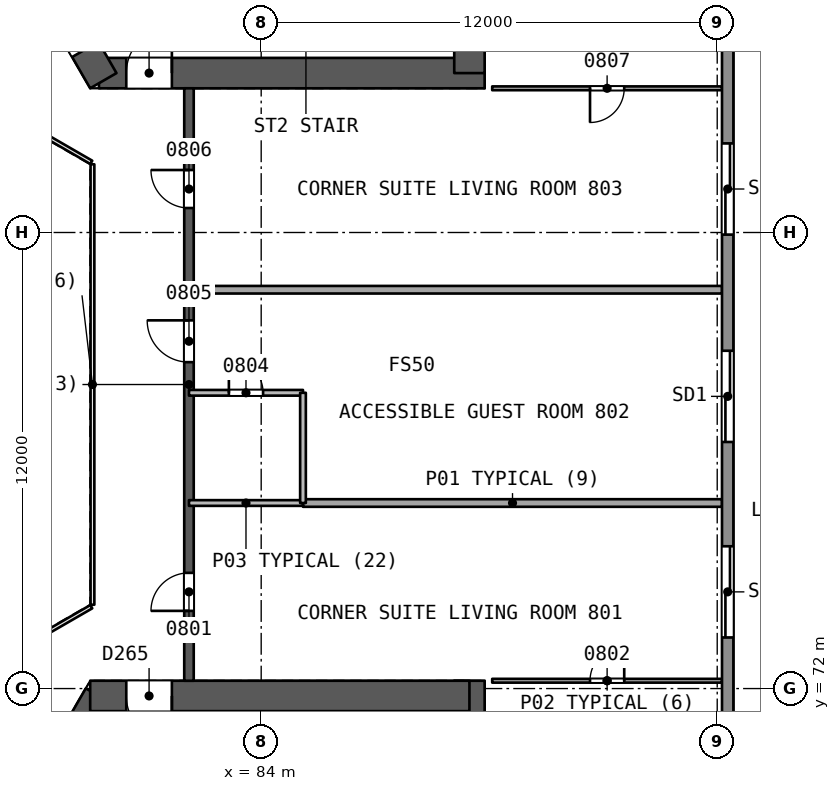
"""IFC4 building model, lengths in metres.
Left out: names, types, materials, properties, quantities, classifications, styles, units other than length and angle.
Written with IfcOpenShell. Run it as: python <this file> out.ifc"""

import sys

from ifc_helpers import new_model, si_unit, direction, frame, frame_2d, origin, place, context, subcontext, project, spatial, rectangle, extrude, element, fill, save


model = new_model("IFC4")
c1 = context("Model", 3, precision=1e-05, world=origin(), true_north=direction((0.0, 1.0)))
c2 = subcontext(c1, "Body", "Model", "MODEL_VIEW")
j1 = project(units=[si_unit("LENGTHUNIT", "METRE"), si_unit("PLANEANGLEUNIT", "RADIAN")], contexts=[c1])
p1 = place(None, origin())
s1 = spatial("IfcSite", under=j1, at=p1, CompositionType="ELEMENT")
p2 = place(p1, origin())
s2 = spatial("IfcBuilding", under=s1, at=p2, CompositionType="ELEMENT")
p3 = place(p2, frame((0.0, 0.0, 41.1)))
s3 = spatial("IfcBuildingStorey", under=s2, at=p3, CompositionType="ELEMENT", Elevation=41.1)
p4 = place(p3, frame((79.731, 88.194, 0.0), z_axis=(0.0, 0.0, 1.0), x_axis=(1.0, 0.0, 0.0)))
e1 = element("IfcWall", 1, at=p4, inside=s3, PredefinedType="SHEAR", context=c2, shape_type="SweptSolid", body=[
    extrude(rectangle(XDim=10.149, YDim=0.8, at=frame_2d((5.074, 0.0))), origin(), (0.0, 0.0, 1.0), 3.7),
])
p5 = place(p4, frame((0.719, 0.0, 0.0)))
e2 = element("IfcOpeningElement", 2, at=p5, cuts=e1, PredefinedType="OPENING", context=c2, shape_type="SweptSolid", body=[
    extrude(rectangle(XDim=1.2, YDim=2.1, at=frame_2d((0.6, 1.05))), frame((0.0, 0.411, 0.0), z_axis=(0.0, -1.0, 0.0), x_axis=(1.0, 0.0, 0.0)), (0.0, 0.0, 1.0), 0.821),
])
p6 = place(p3, frame((89.48, 88.194, 0.0), z_axis=(0.0, 0.0, 1.0), x_axis=(0.0, 1.0, 0.0)))
e3 = element("IfcWall", 3, at=p6, inside=s3, PredefinedType="SHEAR", context=c2, shape_type="SweptSolid", body=[
    extrude(rectangle(XDim=13.933, YDim=0.8, at=frame_2d((6.967, 0.0))), origin(), (0.0, 0.0, 1.0), 3.7),
])
p7 = place(p3, frame((74.856, 96.637, 0.0), z_axis=(0.0, 0.0, 1.0), x_axis=(0.499993500917, -0.866029155999, 0.0)))
e4 = element("IfcWall", 4, at=p7, inside=s3, PredefinedType="SHEAR", context=c2, shape_type="SweptSolid", body=[
    extrude(rectangle(XDim=9.98, YDim=0.8, at=frame_2d((4.99, 0.0))), origin(), (0.0, 0.0, 1.0), 3.7),
])
p8 = place(p7, frame((7.83, 0.0, 0.0)))
e5 = element("IfcOpeningElement", 5, at=p8, cuts=e4, PredefinedType="OPENING", context=c2, shape_type="SweptSolid", body=[
    extrude(rectangle(XDim=1.2, YDim=2.1, at=frame_2d((0.6, 1.05))), frame((0.0, 0.411, 0.0), z_axis=(0.0, -1.0, 0.0), x_axis=(1.0, 0.0, 0.0)), (0.0, 0.0, 1.0), 0.821),
])
p9 = place(p3, frame((79.731, 71.806, 0.0), z_axis=(0.0, 0.0, 1.0), x_axis=(-0.49999662545, -0.866027352073, 0.0)))
e6 = element("IfcWall", 6, at=p9, inside=s3, PredefinedType="SHEAR", context=c2, shape_type="SweptSolid", body=[
    extrude(rectangle(XDim=10.149, YDim=0.8, at=frame_2d((5.074, 0.0))), origin(), (0.0, 0.0, 1.0), 3.7),
])
p10 = place(p9, frame((0.719, 0.0, 0.0)))
e7 = element("IfcOpeningElement", 7, at=p10, cuts=e6, PredefinedType="OPENING", context=c2, shape_type="SweptSolid", body=[
    extrude(rectangle(XDim=1.2, YDim=2.1, at=frame_2d((0.6, 1.05))), frame((0.0, 0.411, 0.0), z_axis=(0.0, -1.0, 0.0), x_axis=(1.0, 0.0, 0.0)), (0.0, 0.0, 1.0), 0.821),
])
p11 = place(p3, frame((89.48, 58.103, 0.0), z_axis=(0.0, 0.0, 1.0), x_axis=(0.0, 1.0, 0.0)))
e8 = element("IfcWall", 8, at=p11, inside=s3, PredefinedType="SHEAR", context=c2, shape_type="SweptSolid", body=[
    extrude(rectangle(XDim=14.103, YDim=0.8, at=frame_2d((7.051, 0.0))), origin(), (0.0, 0.0, 1.0), 3.7),
])
p12 = place(p3, frame((89.48, 71.806, 0.0), z_axis=(0.0, 0.0, 1.0), x_axis=(-1.0, 0.0, 0.0)))
e9 = element("IfcWall", 9, at=p12, inside=s3, PredefinedType="SHEAR", context=c2, shape_type="SweptSolid", body=[
    extrude(rectangle(XDim=9.98, YDim=0.8, at=frame_2d((4.99, 0.0))), origin(), (0.0, 0.0, 1.0), 3.7),
])
p13 = place(p12, frame((7.83, 0.0, 0.0)))
e10 = element("IfcOpeningElement", 10, at=p13, cuts=e9, PredefinedType="OPENING", context=c2, shape_type="SweptSolid", body=[
    extrude(rectangle(XDim=1.2, YDim=2.1, at=frame_2d((0.6, 1.05))), frame((0.0, 0.411, 0.0), z_axis=(0.0, -1.0, 0.0), x_axis=(1.0, 0.0, 0.0)), (0.0, 0.0, 1.0), 0.821),
])
p14 = place(p3, frame((82.1, 72.206, 0.0), z_axis=(0.0, 0.0, 1.0), x_axis=(0.0, 1.0, 0.0)))
e11 = element("IfcWall", 11, at=p14, inside=s3, PredefinedType="SHEAR", context=c2, shape_type="SweptSolid", body=[
    extrude(rectangle(XDim=15.588, YDim=0.25, at=frame_2d((7.794, 0.0))), origin(), (0.0, 0.0, 1.0), 3.2),
])
p15 = place(p14, frame((1.838, 0.0, 0.0)))
e12 = element("IfcOpeningElement", 12, at=p15, cuts=e11, PredefinedType="OPENING", context=c2, shape_type="SweptSolid", body=[
    extrude(rectangle(XDim=1.0, YDim=2.1, at=frame_2d((0.5, 1.05))), frame((0.0, 0.135, 0.0), z_axis=(0.0, -1.0, 0.0), x_axis=(1.0, 0.0, 0.0)), (0.0, 0.0, 1.0), 0.271),
])
p16 = place(p14, frame((8.383, 0.0, 0.0)))
e13 = element("IfcOpeningElement", 13, at=p16, cuts=e11, PredefinedType="OPENING", context=c2, shape_type="SweptSolid", body=[
    extrude(rectangle(XDim=1.1, YDim=2.1, at=frame_2d((0.55, 1.05))), frame((0.0, 0.135, 0.0), z_axis=(0.0, -1.0, 0.0), x_axis=(1.0, 0.0, 0.0)), (0.0, 0.0, 1.0), 0.271),
])
p17 = place(p14, frame((12.438, 0.0, 0.0)))
e14 = element("IfcOpeningElement", 14, at=p17, cuts=e11, PredefinedType="OPENING", context=c2, shape_type="SweptSolid", body=[
    extrude(rectangle(XDim=1.0, YDim=2.1, at=frame_2d((0.5, 1.05))), frame((0.0, 0.135, 0.0), z_axis=(0.0, -1.0, 0.0), x_axis=(1.0, 0.0, 0.0)), (0.0, 0.0, 1.0), 0.271),
])
p18 = place(p3, frame((90.079, 72.206, 0.0), z_axis=(0.0, 0.0, 1.0), x_axis=(1.0, 0.0, 0.0)))
e15 = element("IfcWall", 15, at=p18, inside=s3, PredefinedType="PARTITIONING", context=c2, shape_type="SweptSolid", body=[
    extrude(rectangle(XDim=6.048, YDim=0.1, at=frame_2d((3.024, 0.0))), origin(), (0.0, 0.0, 1.0), 3.2),
])
p19 = place(p18, frame((2.574, 0.0, 0.0)))
e16 = element("IfcOpeningElement", 16, at=p19, cuts=e15, PredefinedType="OPENING", context=c2, shape_type="SweptSolid", body=[
    extrude(rectangle(XDim=0.9, YDim=2.1, at=frame_2d((0.45, 1.05))), frame((0.0, 0.061, 0.0), z_axis=(0.0, -1.0, 0.0), x_axis=(1.0, 0.0, 0.0)), (0.0, 0.0, 1.0), 0.121),
])
p20 = place(p3, frame((96.127, 76.882, 0.0), z_axis=(0.0, 0.0, 1.0), x_axis=(-1.0, 0.0, 0.0)))
e17 = element("IfcWall", 17, at=p20, inside=s3, PredefinedType="PARTITIONING", context=c2, shape_type="SweptSolid", body=[
    extrude(rectangle(XDim=11.027, YDim=0.2, at=frame_2d((5.513, 0.0))), origin(), (0.0, 0.0, 1.0), 3.2),
])
p21 = place(p3, frame((85.1, 76.882, 0.0), z_axis=(0.0, 0.0, 1.0), x_axis=(-1.0, 0.0, 0.0)))
e18 = element("IfcWall", 18, at=p21, inside=s3, PredefinedType="PARTITIONING", context=c2, shape_type="SweptSolid", body=[
    extrude(rectangle(XDim=3.0, YDim=0.15, at=frame_2d((1.5, 0.0))), origin(), (0.0, 0.0, 1.0), 3.2),
])
p22 = place(p3, frame((82.1, 79.782, 0.0), z_axis=(0.0, 0.0, 1.0), x_axis=(1.0, 0.0, 0.0)))
e19 = element("IfcWall", 19, at=p22, inside=s3, PredefinedType="PARTITIONING", context=c2, shape_type="SweptSolid", body=[
    extrude(rectangle(XDim=3.0, YDim=0.15, at=frame_2d((1.5, 0.0))), origin(), (0.0, 0.0, 1.0), 3.2),
])
p23 = place(p22, frame((1.05, 0.0, 0.0)))
e20 = element("IfcOpeningElement", 20, at=p23, cuts=e19, PredefinedType="OPENING", context=c2, shape_type="SweptSolid", body=[
    extrude(rectangle(XDim=0.9, YDim=2.1, at=frame_2d((0.45, 1.05))), frame((0.0, 0.085, 0.0), z_axis=(0.0, -1.0, 0.0), x_axis=(1.0, 0.0, 0.0)), (0.0, 0.0, 1.0), 0.171),
])
p24 = place(p3, frame((85.1, 79.782, 0.0), z_axis=(0.0, 0.0, 1.0), x_axis=(0.0, -1.0, 0.0)))
e21 = element("IfcWall", 21, at=p24, inside=s3, PredefinedType="PARTITIONING", context=c2, shape_type="SweptSolid", body=[
    extrude(rectangle(XDim=2.9, YDim=0.15, at=frame_2d((1.45, 0.0))), origin(), (0.0, 0.0, 1.0), 3.2),
])
p25 = place(p3, frame((96.127, 82.494, 0.0), z_axis=(0.0, 0.0, 1.0), x_axis=(-1.0, 0.0, 0.0)))
e22 = element("IfcWall", 22, at=p25, inside=s3, PredefinedType="PARTITIONING", context=c2, shape_type="SweptSolid", body=[
    extrude(rectangle(XDim=14.027, YDim=0.2, at=frame_2d((7.013, 0.0))), origin(), (0.0, 0.0, 1.0), 3.2),
])
p26 = place(p3, frame((96.127, 87.794, 0.0), z_axis=(0.0, 0.0, 1.0), x_axis=(-1.0, 0.0, 0.0)))
e23 = element("IfcWall", 23, at=p26, inside=s3, PredefinedType="PARTITIONING", context=c2, shape_type="SweptSolid", body=[
    extrude(rectangle(XDim=6.048, YDim=0.1, at=frame_2d((3.024, 0.0))), origin(), (0.0, 0.0, 1.0), 3.2),
])
p27 = place(p26, frame((2.574, 0.0, 0.0)))
e24 = element("IfcOpeningElement", 24, at=p27, cuts=e23, PredefinedType="OPENING", context=c2, shape_type="SweptSolid", body=[
    extrude(rectangle(XDim=0.9, YDim=2.1, at=frame_2d((0.45, 1.05))), frame((0.0, 0.061, 0.0), z_axis=(0.0, -1.0, 0.0), x_axis=(1.0, 0.0, 0.0)), (0.0, 0.0, 1.0), 0.121),
])
p28 = place(p3, frame((96.276, 110.59, 0.0), z_axis=(0.0, 0.0, 1.0), x_axis=(0.0, -1.0, 0.0)))
e25 = element("IfcWall", 25, at=p28, inside=s3, PredefinedType="SOLIDWALL", context=c2, shape_type="SweptSolid", body=[
    extrude(rectangle(XDim=61.18, YDim=0.3, at=frame_2d((30.59, 0.0))), origin(), (0.0, 0.0, 1.0), 3.2),
])
p29 = place(p28, frame((29.702, 0.0, 0.0)))
e26 = element("IfcOpeningElement", 26, at=p29, cuts=e25, PredefinedType="OPENING", context=c2, shape_type="SweptSolid", body=[
    extrude(rectangle(XDim=2.4, YDim=2.4, at=frame_2d((1.2, 1.2))), frame((0.0, 0.161, 0.0), z_axis=(0.0, -1.0, 0.0), x_axis=(1.0, 0.0, 0.0)), (0.0, 0.0, 1.0), 0.321),
])
p30 = place(p28, frame((34.846, 0.0, 0.0)))
e27 = element("IfcOpeningElement", 27, at=p30, cuts=e25, PredefinedType="OPENING", context=c2, shape_type="SweptSolid", body=[
    extrude(rectangle(XDim=2.4, YDim=2.4, at=frame_2d((1.2, 1.2))), frame((0.0, 0.161, 0.0), z_axis=(0.0, -1.0, 0.0), x_axis=(1.0, 0.0, 0.0)), (0.0, 0.0, 1.0), 0.321),
])
p31 = place(p28, frame((47.439, 0.0, 0.0)))
e28 = element("IfcOpeningElement", 28, at=p31, cuts=e25, PredefinedType="OPENING", context=c2, shape_type="SweptSolid", body=[
    extrude(rectangle(XDim=2.4, YDim=2.4, at=frame_2d((1.2, 1.2))), frame((0.0, 0.161, 0.0), z_axis=(0.0, -1.0, 0.0), x_axis=(1.0, 0.0, 0.0)), (0.0, 0.0, 1.0), 0.321),
])
p32 = place(p28, frame((24.246, 0.0, 0.0)))
e29 = element("IfcOpeningElement", 29, at=p32, cuts=e25, PredefinedType="OPENING", context=c2, shape_type="SweptSolid", body=[
    extrude(rectangle(XDim=2.4, YDim=2.4, at=frame_2d((1.2, 1.2))), frame((0.0, 0.161, 0.0), z_axis=(0.0, -1.0, 0.0), x_axis=(1.0, 0.0, 0.0)), (0.0, 0.0, 1.0), 0.321),
])
p33 = place(p28, frame((11.287, 0.0, 0.0)))
e30 = element("IfcOpeningElement", 30, at=p33, cuts=e25, PredefinedType="OPENING", context=c2, shape_type="SweptSolid", body=[
    extrude(rectangle(XDim=2.4, YDim=2.4, at=frame_2d((1.2, 1.2))), frame((0.0, 0.161, 0.0), z_axis=(0.0, -1.0, 0.0), x_axis=(1.0, 0.0, 0.0)), (0.0, 0.0, 1.0), 0.321),
])
p34 = place(p3, frame((37.87, 83.13, 0.0), z_axis=(0.0, 0.0, 1.0), x_axis=(0.866026630825, 0.499997874697, 0.0)))
e31 = element("IfcWall", 31, at=p34, inside=s3, PredefinedType="SOLIDWALL", context=c2, shape_type="SweptSolid", body=[
    extrude(rectangle(XDim=61.18, YDim=0.3, at=frame_2d((30.59, 0.0))), origin(), (0.0, 0.0, 1.0), 3.2),
])
p35 = place(p34, frame((12.181, 0.0, 0.0)))
e32 = element("IfcOpeningElement", 32, at=p35, cuts=e31, PredefinedType="OPENING", context=c2, shape_type="SweptSolid", body=[
    extrude(rectangle(XDim=2.4, YDim=2.4, at=frame_2d((1.2, 1.2))), frame((0.0, 0.161, 0.0), z_axis=(0.0, -1.0, 0.0), x_axis=(1.0, 0.0, 0.0)), (0.0, 0.0, 1.0), 0.321),
])
p36 = place(p34, frame((34.846, 0.0, 0.0)))
e33 = element("IfcOpeningElement", 33, at=p36, cuts=e31, PredefinedType="OPENING", context=c2, shape_type="SweptSolid", body=[
    extrude(rectangle(XDim=2.4, YDim=2.4, at=frame_2d((1.2, 1.2))), frame((0.0, 0.161, 0.0), z_axis=(0.0, -1.0, 0.0), x_axis=(1.0, 0.0, 0.0)), (0.0, 0.0, 1.0), 0.321),
])
p37 = place(p34, frame((47.439, 0.0, 0.0)))
e34 = element("IfcOpeningElement", 34, at=p37, cuts=e31, PredefinedType="OPENING", context=c2, shape_type="SweptSolid", body=[
    extrude(rectangle(XDim=2.4, YDim=2.4, at=frame_2d((1.2, 1.2))), frame((0.0, 0.161, 0.0), z_axis=(0.0, -1.0, 0.0), x_axis=(1.0, 0.0, 0.0)), (0.0, 0.0, 1.0), 0.321),
])
p38 = place(p34, frame((29.078, 0.0, 0.0)))
e35 = element("IfcOpeningElement", 35, at=p38, cuts=e31, PredefinedType="OPENING", context=c2, shape_type="SweptSolid", body=[
    extrude(rectangle(XDim=2.4, YDim=2.4, at=frame_2d((1.2, 1.2))), frame((0.0, 0.161, 0.0), z_axis=(0.0, -1.0, 0.0), x_axis=(1.0, 0.0, 0.0)), (0.0, 0.0, 1.0), 0.321),
])
p39 = place(p3, frame((90.854, 46.28, 0.0), z_axis=(0.0, 0.0, 1.0), x_axis=(-0.866026630825, 0.499997874697, 0.0)))
e36 = element("IfcWall", 36, at=p39, inside=s3, PredefinedType="SOLIDWALL", context=c2, shape_type="SweptSolid", body=[
    extrude(rectangle(XDim=61.18, YDim=0.3, at=frame_2d((30.59, 0.0))), origin(), (0.0, 0.0, 1.0), 3.2),
])
p40 = place(p39, frame((29.39, 0.0, 0.0)))
e37 = element("IfcOpeningElement", 37, at=p40, cuts=e36, PredefinedType="OPENING", context=c2, shape_type="SweptSolid", body=[
    extrude(rectangle(XDim=2.4, YDim=2.4, at=frame_2d((1.2, 1.2))), frame((0.0, 0.161, 0.0), z_axis=(0.0, -1.0, 0.0), x_axis=(1.0, 0.0, 0.0)), (0.0, 0.0, 1.0), 0.321),
])
p41 = place(p39, frame((34.223, 0.0, 0.0)))
e38 = element("IfcOpeningElement", 38, at=p41, cuts=e36, PredefinedType="OPENING", context=c2, shape_type="SweptSolid", body=[
    extrude(rectangle(XDim=2.4, YDim=2.4, at=frame_2d((1.2, 1.2))), frame((0.0, 0.161, 0.0), z_axis=(0.0, -1.0, 0.0), x_axis=(1.0, 0.0, 0.0)), (0.0, 0.0, 1.0), 0.321),
])
p42 = place(p39, frame((47.439, 0.0, 0.0)))
e39 = element("IfcOpeningElement", 39, at=p42, cuts=e36, PredefinedType="OPENING", context=c2, shape_type="SweptSolid", body=[
    extrude(rectangle(XDim=2.4, YDim=2.4, at=frame_2d((1.2, 1.2))), frame((0.0, 0.161, 0.0), z_axis=(0.0, -1.0, 0.0), x_axis=(1.0, 0.0, 0.0)), (0.0, 0.0, 1.0), 0.321),
])
p43 = place(p39, frame((13.116, 0.0, 0.0)))
e40 = element("IfcOpeningElement", 40, at=p43, cuts=e36, PredefinedType="OPENING", context=c2, shape_type="SweptSolid", body=[
    extrude(rectangle(XDim=2.4, YDim=2.4, at=frame_2d((1.2, 1.2))), frame((0.0, 0.161, 0.0), z_axis=(0.0, -1.0, 0.0), x_axis=(1.0, 0.0, 0.0)), (0.0, 0.0, 1.0), 0.321),
])
p44 = place(p3, frame((79.56, 74.206, 0.0), z_axis=(0.0, 0.0, 1.0), x_axis=(0.0, 1.0, 0.0)))
e41 = element("IfcWall", 41, at=p44, inside=s3, PredefinedType="PARTITIONING", context=c2, shape_type="SweptSolid", body=[
    extrude(rectangle(XDim=11.588, YDim=0.1, at=frame_2d((5.794, 0.0))), origin(), (0.0, 0.0, 1.0), 3.2),
])
for number, where, z_axis, x_axis in (
    (42, (79.53, 85.846, 0.0), (0.0, 0.0, 1.0), (-0.866, 0.5, 0.0)),
    (43, (77.798, 73.154, 0.0), (0.0, 0.0, 1.0), (0.866, 0.5, 0.0)),
):
    element("IfcWall", number, at=place(p3, frame(where, z_axis=z_axis, x_axis=x_axis)), inside=s3, PredefinedType="PARTITIONING", context=c2, shape_type="SweptSolid", body=[
        extrude(rectangle(XDim=2.0, YDim=0.1, at=frame_2d((1.0, 0.0))), origin(), (0.0, 0.0, 1.0), 3.2),
    ])
p45 = place(p15, origin())
e44 = element("IfcDoor", 44, at=p45, inside=s3, OperationType="SINGLE_SWING_LEFT", PredefinedType="NOTDEFINED", context=c2, shape_type="SweptSolid", body=[
    extrude(rectangle(XDim=1.0, YDim=2.1, at=frame_2d((0.5, 1.05))), frame((0.0, 0.025, 0.0), z_axis=(0.0, -1.0, 0.0), x_axis=(1.0, 0.0, 0.0)), (0.0, 0.0, 1.0), 0.05),
])
fill(e12, e44)
p46 = place(p19, origin())
e45 = element("IfcDoor", 45, at=p46, inside=s3, OperationType="SINGLE_SWING_RIGHT", PredefinedType="NOTDEFINED", context=c2, shape_type="SweptSolid", body=[
    extrude(rectangle(XDim=0.9, YDim=2.1, at=frame_2d((0.45, 1.05))), frame((0.0, 0.025, 0.0), z_axis=(0.0, -1.0, 0.0), x_axis=(1.0, 0.0, 0.0)), (0.0, 0.0, 1.0), 0.05),
])
fill(e16, e45)
p47 = place(p23, origin())
e46 = element("IfcDoor", 46, at=p47, inside=s3, OperationType="SINGLE_SWING_LEFT", PredefinedType="NOTDEFINED", context=c2, shape_type="SweptSolid", body=[
    extrude(rectangle(XDim=0.9, YDim=2.1, at=frame_2d((0.45, 1.05))), frame((0.0, 0.025, 0.0), z_axis=(0.0, -1.0, 0.0), x_axis=(1.0, 0.0, 0.0)), (0.0, 0.0, 1.0), 0.05),
])
fill(e20, e46)
p48 = place(p16, origin())
e47 = element("IfcDoor", 47, at=p48, inside=s3, OperationType="SINGLE_SWING_RIGHT", PredefinedType="NOTDEFINED", context=c2, shape_type="SweptSolid", body=[
    extrude(rectangle(XDim=1.1, YDim=2.1, at=frame_2d((0.55, 1.05))), frame((0.0, 0.025, 0.0), z_axis=(0.0, -1.0, 0.0), x_axis=(1.0, 0.0, 0.0)), (0.0, 0.0, 1.0), 0.05),
])
fill(e13, e47)
p49 = place(p17, origin())
e48 = element("IfcDoor", 48, at=p49, inside=s3, OperationType="SINGLE_SWING_RIGHT", PredefinedType="NOTDEFINED", context=c2, shape_type="SweptSolid", body=[
    extrude(rectangle(XDim=1.0, YDim=2.1, at=frame_2d((0.5, 1.05))), frame((0.0, 0.025, 0.0), z_axis=(0.0, -1.0, 0.0), x_axis=(1.0, 0.0, 0.0)), (0.0, 0.0, 1.0), 0.05),
])
fill(e14, e48)
p50 = place(p27, origin())
e49 = element("IfcDoor", 49, at=p50, inside=s3, OperationType="SINGLE_SWING_RIGHT", PredefinedType="NOTDEFINED", context=c2, shape_type="SweptSolid", body=[
    extrude(rectangle(XDim=0.9, YDim=2.1, at=frame_2d((0.45, 1.05))), frame((0.0, 0.025, 0.0), z_axis=(0.0, -1.0, 0.0), x_axis=(1.0, 0.0, 0.0)), (0.0, 0.0, 1.0), 0.05),
])
fill(e24, e49)
p51 = place(p29, origin())
e50 = element("IfcDoor", 50, at=p51, inside=s3, OperationType="SLIDING_TO_LEFT", PredefinedType="NOTDEFINED", context=c2, shape_type="SweptSolid", body=[
    extrude(rectangle(XDim=2.4, YDim=2.4, at=frame_2d((1.2, 1.2))), frame((0.0, 0.025, 0.0), z_axis=(0.0, -1.0, 0.0), x_axis=(1.0, 0.0, 0.0)), (0.0, 0.0, 1.0), 0.05),
])
fill(e26, e50)
p52 = place(p30, origin())
e51 = element("IfcDoor", 51, at=p52, inside=s3, OperationType="SLIDING_TO_RIGHT", PredefinedType="NOTDEFINED", context=c2, shape_type="SweptSolid", body=[
    extrude(rectangle(XDim=2.4, YDim=2.4, at=frame_2d((1.2, 1.2))), frame((0.0, 0.025, 0.0), z_axis=(0.0, -1.0, 0.0), x_axis=(1.0, 0.0, 0.0)), (0.0, 0.0, 1.0), 0.05),
])
fill(e27, e51)
p53 = place(p32, origin())
e52 = element("IfcDoor", 52, at=p53, inside=s3, OperationType="SLIDING_TO_RIGHT", PredefinedType="NOTDEFINED", context=c2, shape_type="SweptSolid", body=[
    extrude(rectangle(XDim=2.4, YDim=2.4, at=frame_2d((1.2, 1.2))), frame((0.0, 0.025, 0.0), z_axis=(0.0, -1.0, 0.0), x_axis=(1.0, 0.0, 0.0)), (0.0, 0.0, 1.0), 0.05),
])
fill(e29, e52)
p54 = place(p5, origin())
e53 = element("IfcDoor", 53, at=p54, inside=s3, OperationType="SINGLE_SWING_RIGHT", PredefinedType="NOTDEFINED", context=c2, shape_type="SweptSolid", body=[
    extrude(rectangle(XDim=1.2, YDim=2.1, at=frame_2d((0.6, 1.05))), frame((0.0, 0.025, 0.0), z_axis=(0.0, -1.0, 0.0), x_axis=(1.0, 0.0, 0.0)), (0.0, 0.0, 1.0), 0.05),
])
fill(e2, e53)
p55 = place(p13, origin())
e54 = element("IfcDoor", 54, at=p55, inside=s3, OperationType="SINGLE_SWING_LEFT", PredefinedType="NOTDEFINED", context=c2, shape_type="SweptSolid", body=[
    extrude(rectangle(XDim=1.2, YDim=2.1, at=frame_2d((0.6, 1.05))), frame((0.0, 0.025, 0.0), z_axis=(0.0, -1.0, 0.0), x_axis=(1.0, 0.0, 0.0)), (0.0, 0.0, 1.0), 0.05),
])
fill(e10, e54)
save(model, sys.argv[1])
